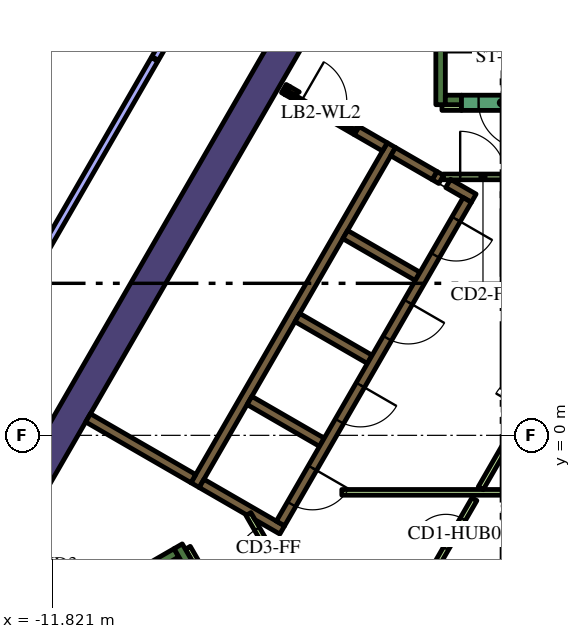
"""IFC4 building model, lengths in metres.
Left out: names, types, materials, properties, quantities, classifications, styles, units other than length and angle.
Written with IfcOpenShell. Run it as: python <this file> out.ifc"""

import sys

from ifc_helpers import new_model, si_unit, direction, frame, frame_2d, origin, place, context, subcontext, project, spatial, polyline, rectangle, outline, extrude, element, fill, save


model = new_model("IFC4")
c1 = context("Model", 3, precision=1e-05, world=origin(), true_north=direction((0.0, 1.0)))
c2 = subcontext(c1, "Body", "Model", "MODEL_VIEW")
j1 = project(units=[si_unit("LENGTHUNIT", "METRE"), si_unit("PLANEANGLEUNIT", "RADIAN")], contexts=[c1])
p1 = place(None, origin())
s1 = spatial("IfcSite", under=j1, at=p1, CompositionType="ELEMENT")
p2 = place(p1, origin())
s2 = spatial("IfcBuilding", under=s1, at=p2, CompositionType="ELEMENT")
p3 = place(p2, frame((0.0, 0.0, 166.8)))
s3 = spatial("IfcBuildingStorey", under=s2, at=p3, CompositionType="ELEMENT", Elevation=166.8)
p4 = place(p3, frame((-12.668, -1.842, 0.0), z_axis=(0.0, 0.0, 1.0), x_axis=(0.500003640647, 0.866023301845, 0.0)))
e1 = element("IfcWall", 1, at=p4, inside=s3, PredefinedType="SOLIDWALL", context=c2, shape_type="SweptSolid", body=[
    extrude(rectangle(XDim=15.858, YDim=0.8, at=frame_2d((7.929, 0.0))), origin(), (0.0, 0.0, 1.0), 4.2),
])
p5 = place(p3, frame((-1.6, 8.7, 0.0), z_axis=(0.0, 0.0, 1.0), x_axis=(0.0, 1.0, 0.0)))
e2 = element("IfcWall", 2, at=p5, inside=s3, PredefinedType="SOLIDWALL", context=c2, shape_type="SweptSolid", body=[
    extrude(rectangle(XDim=7.05, YDim=0.25, at=frame_2d((3.525, 0.0))), origin(), (0.0, 0.0, 1.0), 4.2),
])
p6 = place(p3, frame((-1.475, 8.825, 0.0), z_axis=(0.0, 0.0, 1.0), x_axis=(1.0, 0.0, 0.0)))
e3 = element("IfcWall", 3, at=p6, inside=s3, PredefinedType="SOLIDWALL", context=c2, shape_type="SweptSolid", body=[
    extrude(rectangle(XDim=0.425, YDim=0.25, at=frame_2d((0.212, 0.0))), origin(), (0.0, 0.0, 1.0), 4.2),
])
p7 = place(p3, frame((-14.44, -6.49, 0.0), z_axis=(0.0, 0.0, 1.0), x_axis=(0.866022966069, 0.500004222222, 0.0)))
e4 = element("IfcWall", 4, at=p7, inside=s3, PredefinedType="SOLIDWALL", context=c2, shape_type="SweptSolid", body=[
    extrude(rectangle(XDim=6.8, YDim=0.25, at=frame_2d((3.4, 0.0))), origin(), (0.0, 0.0, 1.0), 4.2),
])
p8 = place(p3, frame((-8.168, -3.503, 0.0), z_axis=(0.0, 0.0, 1.0), x_axis=(-0.499952099219, 0.866053057547, 0.0)))
e5 = element("IfcWall", 5, at=p8, inside=s3, PredefinedType="SOLIDWALL", context=c2, shape_type="SweptSolid", body=[
    extrude(rectangle(XDim=0.675, YDim=0.25, at=frame_2d((0.337, 0.0))), origin(), (0.0, 0.0, 1.0), 4.2),
])
p9 = place(p3, frame((-8.06, -1.311, 0.0), z_axis=(0.0, 0.0, 1.0), x_axis=(0.50000273126, 0.866023826885, 0.0)))
e6 = element("IfcWall", 6, at=p9, inside=s3, PredefinedType="SOLIDWALL", context=c2, shape_type="SweptSolid", body=[
    extrude(rectangle(XDim=10.33, YDim=0.25, at=frame_2d((5.165, 0.0))), origin(), (0.0, 0.0, 1.0), 4.2),
])
p10 = place(p3, frame((-1.758, 6.835, 0.0), z_axis=(0.0, 0.0, 1.0), x_axis=(0.865982457891, -0.500074377092, 0.0)))
e7 = element("IfcWall", 7, at=p10, inside=s3, PredefinedType="SOLIDWALL", context=c2, shape_type="SweptSolid", body=[
    extrude(rectangle(XDim=0.2, YDim=0.25, at=frame_2d((0.1, 0.0))), origin(), (0.0, 0.0, 1.0), 4.2),
])
p11 = place(p3, frame((-1.76, 6.836, 0.0), z_axis=(0.0, 0.0, 1.0), x_axis=(-0.865952863304, 0.500125622755, 0.0)))
e8 = element("IfcWall", 8, at=p11, inside=s3, PredefinedType="SOLIDWALL", context=c2, shape_type="SweptSolid", body=[
    extrude(rectangle(XDim=1.258, YDim=0.25, at=frame_2d((0.629, 0.0))), origin(), (0.0, 0.0, 1.0), 4.2),
])
p12 = place(p3, frame((-0.728, 6.24, 0.0), z_axis=(0.0, 0.0, 1.0), x_axis=(-0.865955664968, 0.500120771724, 0.0)))
e9 = element("IfcWall", 9, at=p12, inside=s3, PredefinedType="SOLIDWALL", context=c2, shape_type="SweptSolid", body=[
    extrude(rectangle(XDim=0.778, YDim=0.25, at=frame_2d((0.389, 0.0))), origin(), (0.0, 0.0, 1.0), 4.2),
])
for number, where, z_axis, x_axis in (
    (10, (-2.204, 4.182, 0.0), (0.0, 0.0, 1.0), (-0.866, 0.5, 0.0)),
    (11, (-5.369, 3.1, 0.0), (0.0, 0.0, 1.0), (0.866, -0.5, 0.0)),
    (12, (-4.724, -0.182, 0.0), (0.0, 0.0, 1.0), (-0.866, 0.5, 0.0)),
):
    element("IfcWall", number, at=place(p3, frame(where, z_axis=z_axis, x_axis=x_axis)), inside=s3, PredefinedType="SOLIDWALL", context=c2, shape_type="SweptSolid", body=[
        extrude(rectangle(XDim=2.2, YDim=0.25, at=frame_2d((1.1, 0.0))), origin(), (0.0, 0.0, 1.0), 4.2),
    ])
p13 = place(p3, origin())
e13 = element("IfcWall", 13, at=p13, inside=s3, PredefinedType="SOLIDWALL", context=c2, shape_type="SweptSolid", body=[
    extrude(outline(polyline([(-5.922, -2.257), (-5.922, -2.257), (-5.705, -2.382), (-5.83, -2.598), (-6.483, -2.221), (-6.591, -2.033), (-6.591, -2.033), (-6.7, -2.096), (-7.952, -1.373), (-7.827, -1.156), (-5.922, -2.257)])), origin(), (0.0, 0.0, 1.0), 4.2),
])
p14 = place(p3, frame((-8.106, -1.14, 0.0), z_axis=(0.0, 0.0, 1.0), x_axis=(-0.866008981251, 0.500028443584, 0.0)))
e14 = element("IfcWall", 14, at=p14, inside=s3, PredefinedType="SOLIDWALL", context=c2, shape_type="SweptSolid", body=[
    extrude(rectangle(XDim=3.2, YDim=0.25, at=frame_2d((1.6, 0.0))), origin(), (0.0, 0.0, 1.0), 4.2),
])
p15 = place(p3, frame((-5.725, 9.125, 0.0), z_axis=(0.0, 0.0, 1.0), x_axis=(0.866185586049, -0.49972245349, 0.0)))
e15 = element("IfcWall", 15, at=p15, inside=s3, PredefinedType="SOLIDWALL", context=c2, shape_type="SweptSolid", body=[
    extrude(rectangle(XDim=0.11, YDim=0.25, at=frame_2d((0.055, 0.0))), origin(), (0.0, 0.0, 1.0), 4.2),
])
p16 = place(p3, frame((-3.066, 7.59, 0.0), z_axis=(0.0, 0.0, 1.0), x_axis=(-0.866081358704, 0.49990307071, 0.0)))
e16 = element("IfcWall", 16, at=p16, inside=s3, PredefinedType="SOLIDWALL", context=c2, shape_type="SweptSolid", body=[
    extrude(rectangle(XDim=0.858, YDim=0.25, at=frame_2d((0.429, 0.0))), origin(), (0.0, 0.0, 1.0), 4.2),
])
e17 = element("IfcWall", 17, at=p13, inside=s3, PredefinedType="SOLIDWALL", context=c2, shape_type="SweptSolid", body=[
    extrude(outline(polyline([(-3.748, 8.128), (-3.813, 8.015), (-4.027, 8.139), (-4.017, 8.156), (-4.008, 8.173), (-4.0, 8.192), (-3.995, 8.21), (-3.991, 8.23), (-3.99, 8.25), (-3.99, 8.268), (-3.748, 8.128)])), origin(), (0.0, 0.0, 1.0), 4.2),
])
e18 = element("IfcWall", 18, at=p13, inside=s3, PredefinedType="SOLIDWALL", context=c2, shape_type="SweptSolid", body=[
    extrude(outline(polyline([(-5.689, 8.96), (-5.69, 8.961), (-5.565, 9.177), (-5.319, 9.035), (-5.335, 9.026), (-5.351, 9.015), (-5.366, 9.002), (-5.379, 8.988), (-5.392, 8.972), (-5.402, 8.956), (-5.412, 8.939), (-5.629, 9.064), (-5.629, 9.064), (-5.689, 8.96)])), origin(), (0.0, 0.0, 1.0), 4.2),
])
for number, where, z_axis, x_axis in (
    (19, (-8.252, -2.958, 0.0), (0.0, 0.0, 1.0), (0.5, -0.866, 0.0)),
    (20, (-1.564, 8.625, 0.0), (0.0, 0.0, 1.0), (1.0, 0.0, 0.0)),
):
    element("IfcWall", number, at=place(p3, frame(where, z_axis=z_axis, x_axis=x_axis)), inside=s3, PredefinedType="PARTITIONING", context=c2, shape_type="SweptSolid", body=[
        extrude(rectangle(XDim=0.514, YDim=0.15, at=frame_2d((0.257, 0.0))), origin(), (0.0, 0.0, 1.0), 3.15),
    ])
p17 = place(p3, frame((-4.2, -1.5, 0.0), z_axis=(0.0, 0.0, 1.0), x_axis=(1.0, 0.0, 0.0)))
e21 = element("IfcWall", 21, at=p17, inside=s3, PredefinedType="PARTITIONING", context=c2, shape_type="SweptSolid", body=[
    extrude(rectangle(XDim=9.359, YDim=0.15, at=frame_2d((4.68, 0.0))), origin(), (0.0, 0.0, 1.0), 3.15),
])
p18 = place(p3, frame((-0.544, -1.393, 0.0), z_axis=(0.0, 0.0, 1.0), x_axis=(0.499928740635, 0.866066541489, 0.0)))
e22 = element("IfcWall", 22, at=p18, inside=s3, PredefinedType="PARTITIONING", context=c2, shape_type="SweptSolid", body=[
    extrude(rectangle(XDim=1.912, YDim=0.15, at=frame_2d((0.956, 0.0))), origin(), (0.0, 0.0, 1.0), 3.15),
])
p19 = place(p3, frame((-0.898, 6.194, 0.0), z_axis=(0.0, 0.0, 1.0), x_axis=(-0.499996202215, -0.866027596426, 0.0)))
e23 = element("IfcWall", 23, at=p19, inside=s3, PredefinedType="SOLIDWALL", context=c2, shape_type="SweptSolid", body=[
    extrude(rectangle(XDim=9.83, YDim=0.25, at=frame_2d((4.915, 0.0))), origin(), (0.0, 0.0, 1.0), 4.2),
])
p20 = place(p19, frame((0.585, 0.0, 0.0)))
e24 = element("IfcOpeningElement", 24, at=p20, cuts=e23, PredefinedType="OPENING", context=c2, shape_type="SweptSolid", body=[
    extrude(rectangle(XDim=1.1, YDim=2.1, at=frame_2d((0.55, 1.05))), frame((0.0, 0.135, 0.0), z_axis=(0.0, -1.0, 0.0), x_axis=(1.0, 0.0, 0.0)), (0.0, 0.0, 1.0), 0.27),
])
p21 = place(p19, frame((3.105, 0.0, 0.0)))
e25 = element("IfcOpeningElement", 25, at=p21, cuts=e23, PredefinedType="OPENING", context=c2, shape_type="SweptSolid", body=[
    extrude(rectangle(XDim=1.1, YDim=2.1, at=frame_2d((0.55, 1.05))), frame((0.0, 0.135, 0.0), z_axis=(0.0, -1.0, 0.0), x_axis=(1.0, 0.0, 0.0)), (0.0, 0.0, 1.0), 0.27),
])
p22 = place(p19, frame((5.625, 0.0, 0.0)))
e26 = element("IfcOpeningElement", 26, at=p22, cuts=e23, PredefinedType="OPENING", context=c2, shape_type="SweptSolid", body=[
    extrude(rectangle(XDim=1.1, YDim=2.1, at=frame_2d((0.55, 1.05))), frame((0.0, 0.135, 0.0), z_axis=(0.0, -1.0, 0.0), x_axis=(1.0, 0.0, 0.0)), (0.0, 0.0, 1.0), 0.27),
])
p23 = place(p19, frame((8.145, 0.0, 0.0)))
e27 = element("IfcOpeningElement", 27, at=p23, cuts=e23, PredefinedType="OPENING", context=c2, shape_type="SweptSolid", body=[
    extrude(rectangle(XDim=1.1, YDim=2.1, at=frame_2d((0.55, 1.05))), frame((0.0, 0.135, 0.0), z_axis=(0.0, -1.0, 0.0), x_axis=(1.0, 0.0, 0.0)), (0.0, 0.0, 1.0), 0.27),
])
p24 = place(p3, frame((1.05, 8.75, 0.0), z_axis=(0.0, 0.0, 1.0), x_axis=(-1.0, 0.0, 0.0)))
e28 = element("IfcWall", 28, at=p24, inside=s3, PredefinedType="SOLIDWALL", context=c2, shape_type="SweptSolid", body=[
    extrude(rectangle(XDim=2.1, YDim=0.4, at=frame_2d((1.05, 0.0))), origin(), (0.0, 0.0, 1.0), 4.2),
])
p25 = place(p24, frame((0.45, 0.0, 0.0)))
e29 = element("IfcOpeningElement", 29, at=p25, cuts=e28, PredefinedType="OPENING", context=c2, shape_type="SweptSolid", body=[
    extrude(rectangle(XDim=1.2, YDim=2.1, at=frame_2d((0.6, 1.05))), frame((0.0, 0.21, 0.0), z_axis=(0.0, -1.0, 0.0), x_axis=(1.0, 0.0, 0.0)), (0.0, 0.0, 1.0), 0.42),
])
p26 = place(p3, frame((-1.76, -3.498, 0.0), z_axis=(0.0, 0.0, 1.0), x_axis=(0.499977374825, 0.866038466041, 0.0)))
e30 = element("IfcWall", 30, at=p26, inside=s3, PredefinedType="PARTITIONING", context=c2, shape_type="SweptSolid", body=[
    extrude(rectangle(XDim=2.1, YDim=0.15, at=frame_2d((1.05, 0.0))), origin(), (0.0, 0.0, 1.0), 3.15),
])
p27 = place(p26, frame((0.6, 0.0, 0.0)))
e31 = element("IfcOpeningElement", 31, at=p27, cuts=e30, PredefinedType="OPENING", context=c2, shape_type="SweptSolid", body=[
    extrude(rectangle(XDim=0.9, YDim=2.1, at=frame_2d((0.45, 1.05))), frame((0.0, 0.085, 0.0), z_axis=(0.0, -1.0, 0.0), x_axis=(1.0, 0.0, 0.0)), (0.0, 0.0, 1.0), 0.17),
])
p28 = place(p3, frame((-1.534, 6.8, 0.0), z_axis=(0.0, 0.0, 1.0), x_axis=(1.0, 0.0, 0.0)))
e32 = element("IfcWall", 32, at=p28, inside=s3, PredefinedType="PARTITIONING", context=c2, shape_type="SweptSolid", body=[
    extrude(rectangle(XDim=2.1, YDim=0.15, at=frame_2d((1.05, 0.0))), origin(), (0.0, 0.0, 1.0), 3.15),
])
p29 = place(p28, frame((0.45, 0.0, 0.0)))
e33 = element("IfcOpeningElement", 33, at=p29, cuts=e32, PredefinedType="OPENING", context=c2, shape_type="SweptSolid", body=[
    extrude(rectangle(XDim=1.2, YDim=2.1, at=frame_2d((0.6, 1.05))), frame((0.0, 0.085, 0.0), z_axis=(0.0, -1.0, 0.0), x_axis=(1.0, 0.0, 0.0)), (0.0, 0.0, 1.0), 0.17),
])
p30 = place(p3, frame((-5.606, -3.89, 0.0), z_axis=(0.0, 0.0, 1.0), x_axis=(-0.500027713859, 0.866009402589, 0.0)))
e34 = element("IfcWall", 34, at=p30, inside=s3, PredefinedType="PARTITIONING", context=c2, shape_type="SweptSolid", body=[
    extrude(rectangle(XDim=2.1, YDim=0.15, at=frame_2d((1.05, 0.0))), origin(), (0.0, 0.0, 1.0), 3.15),
])
p31 = place(p30, frame((0.45, 0.0, 0.0)))
e35 = element("IfcOpeningElement", 35, at=p31, cuts=e34, PredefinedType="OPENING", context=c2, shape_type="SweptSolid", body=[
    extrude(rectangle(XDim=1.2, YDim=2.1, at=frame_2d((0.6, 1.05))), frame((0.0, 0.085, 0.0), z_axis=(0.0, -1.0, 0.0), x_axis=(1.0, 0.0, 0.0)), (0.0, 0.0, 1.0), 0.17),
])
p32 = place(p3, frame((-5.659, 9.012, 0.0), z_axis=(0.0, 0.0, 1.0), x_axis=(0.866009402589, -0.500027713859, 0.0)))
e36 = element("IfcWall", 36, at=p32, inside=s3, PredefinedType="PARTITIONING", context=c2, shape_type="SweptSolid", body=[
    extrude(rectangle(XDim=2.1, YDim=0.12, at=frame_2d((1.05, 0.0))), origin(), (0.0, 0.0, 1.0), 3.15),
])
p33 = place(p32, frame((0.45, 0.0, 0.0)))
e37 = element("IfcOpeningElement", 37, at=p33, cuts=e36, PredefinedType="OPENING", context=c2, shape_type="SweptSolid", body=[
    extrude(rectangle(XDim=1.2, YDim=2.1, at=frame_2d((0.6, 1.05))), frame((0.0, 0.07, 0.0), z_axis=(0.0, -1.0, 0.0), x_axis=(1.0, 0.0, 0.0)), (0.0, 0.0, 1.0), 0.14),
])
p34 = place(p3, frame((-9.126, 9.893, 0.0), z_axis=(0.0, 0.0, 1.0), x_axis=(-0.499995158272, -0.866028199139, 0.0)))
e38 = element("IfcWall", 38, at=p34, inside=s3, PredefinedType="PARTITIONING", context=c2, shape_type="SweptSolid", body=[
    extrude(rectangle(XDim=8.008, YDim=0.2, at=frame_2d((4.004, 0.0))), origin(), (0.0, 0.0, 1.0), 3.15),
])
p35 = place(p3, frame((-4.757, 17.461, 0.0), z_axis=(0.0, 0.0, 1.0), x_axis=(-0.499998278779, -0.866026397529, 0.0)))
e39 = element("IfcWall", 39, at=p35, inside=s3, PredefinedType="PARTITIONING", context=c2, shape_type="SweptSolid", body=[
    extrude(rectangle(XDim=8.709, YDim=0.2, at=frame_2d((4.354, 0.0))), origin(), (0.0, 0.0, 1.0), 3.15),
])
p36 = place(p20, origin())
e40 = element("IfcDoor", 40, at=p36, inside=s3, OperationType="DOUBLE_DOOR_SLIDING", PredefinedType="DOOR", context=c2, shape_type="SweptSolid", body=[
    extrude(rectangle(XDim=1.1, YDim=2.1, at=frame_2d((0.55, 1.05))), frame((0.0, 0.025, 0.0), z_axis=(0.0, -1.0, 0.0), x_axis=(1.0, 0.0, 0.0)), (0.0, 0.0, 1.0), 0.05),
])
fill(e24, e40)
p37 = place(p21, origin())
e41 = element("IfcDoor", 41, at=p37, inside=s3, OperationType="DOUBLE_DOOR_SLIDING", PredefinedType="DOOR", context=c2, shape_type="SweptSolid", body=[
    extrude(rectangle(XDim=1.1, YDim=2.1, at=frame_2d((0.55, 1.05))), frame((0.0, 0.025, 0.0), z_axis=(0.0, -1.0, 0.0), x_axis=(1.0, 0.0, 0.0)), (0.0, 0.0, 1.0), 0.05),
])
fill(e25, e41)
p38 = place(p22, origin())
e42 = element("IfcDoor", 42, at=p38, inside=s3, OperationType="DOUBLE_DOOR_SLIDING", PredefinedType="DOOR", context=c2, shape_type="SweptSolid", body=[
    extrude(rectangle(XDim=1.1, YDim=2.1, at=frame_2d((0.55, 1.05))), frame((0.0, 0.025, 0.0), z_axis=(0.0, -1.0, 0.0), x_axis=(1.0, 0.0, 0.0)), (0.0, 0.0, 1.0), 0.05),
])
fill(e26, e42)
p39 = place(p23, origin())
e43 = element("IfcDoor", 43, at=p39, inside=s3, OperationType="DOUBLE_DOOR_SLIDING", PredefinedType="DOOR", context=c2, shape_type="SweptSolid", body=[
    extrude(rectangle(XDim=1.1, YDim=2.1, at=frame_2d((0.55, 1.05))), frame((0.0, 0.025, 0.0), z_axis=(0.0, -1.0, 0.0), x_axis=(1.0, 0.0, 0.0)), (0.0, 0.0, 1.0), 0.05),
])
fill(e27, e43)
p40 = place(p25, origin())
e44 = element("IfcDoor", 44, at=p40, inside=s3, OperationType="SINGLE_SWING_LEFT", PredefinedType="DOOR", context=c2, shape_type="SweptSolid", body=[
    extrude(rectangle(XDim=1.2, YDim=2.1, at=frame_2d((0.6, 1.05))), frame((0.0, 0.025, 0.0), z_axis=(0.0, -1.0, 0.0), x_axis=(1.0, 0.0, 0.0)), (0.0, 0.0, 1.0), 0.05),
])
fill(e29, e44)
p41 = place(p27, origin())
e45 = element("IfcDoor", 45, at=p41, inside=s3, OperationType="SINGLE_SWING_LEFT", PredefinedType="DOOR", context=c2, shape_type="SweptSolid", body=[
    extrude(rectangle(XDim=0.9, YDim=2.1, at=frame_2d((0.45, 1.05))), frame((0.0, 0.025, 0.0), z_axis=(0.0, -1.0, 0.0), x_axis=(1.0, 0.0, 0.0)), (0.0, 0.0, 1.0), 0.05),
])
fill(e31, e45)
p42 = place(p29, origin())
e46 = element("IfcDoor", 46, at=p42, inside=s3, OperationType="SINGLE_SWING_LEFT", PredefinedType="DOOR", context=c2, shape_type="SweptSolid", body=[
    extrude(rectangle(XDim=1.2, YDim=2.1, at=frame_2d((0.6, 1.05))), frame((0.0, 0.025, 0.0), z_axis=(0.0, -1.0, 0.0), x_axis=(1.0, 0.0, 0.0)), (0.0, 0.0, 1.0), 0.05),
])
fill(e33, e46)
p43 = place(p31, origin())
e47 = element("IfcDoor", 47, at=p43, inside=s3, OperationType="SINGLE_SWING_LEFT", PredefinedType="DOOR", context=c2, shape_type="SweptSolid", body=[
    extrude(rectangle(XDim=1.2, YDim=2.1, at=frame_2d((0.6, 1.05))), frame((0.0, 0.025, 0.0), z_axis=(0.0, -1.0, 0.0), x_axis=(1.0, 0.0, 0.0)), (0.0, 0.0, 1.0), 0.05),
])
fill(e35, e47)
p44 = place(p33, origin())
e48 = element("IfcDoor", 48, at=p44, inside=s3, OperationType="SINGLE_SWING_LEFT", PredefinedType="DOOR", context=c2, shape_type="SweptSolid", body=[
    extrude(rectangle(XDim=1.2, YDim=2.1, at=frame_2d((0.6, 1.05))), frame((0.0, 0.025, 0.0), z_axis=(0.0, -1.0, 0.0), x_axis=(1.0, 0.0, 0.0)), (0.0, 0.0, 1.0), 0.05),
])
fill(e37, e48)
save(model, sys.argv[1])
